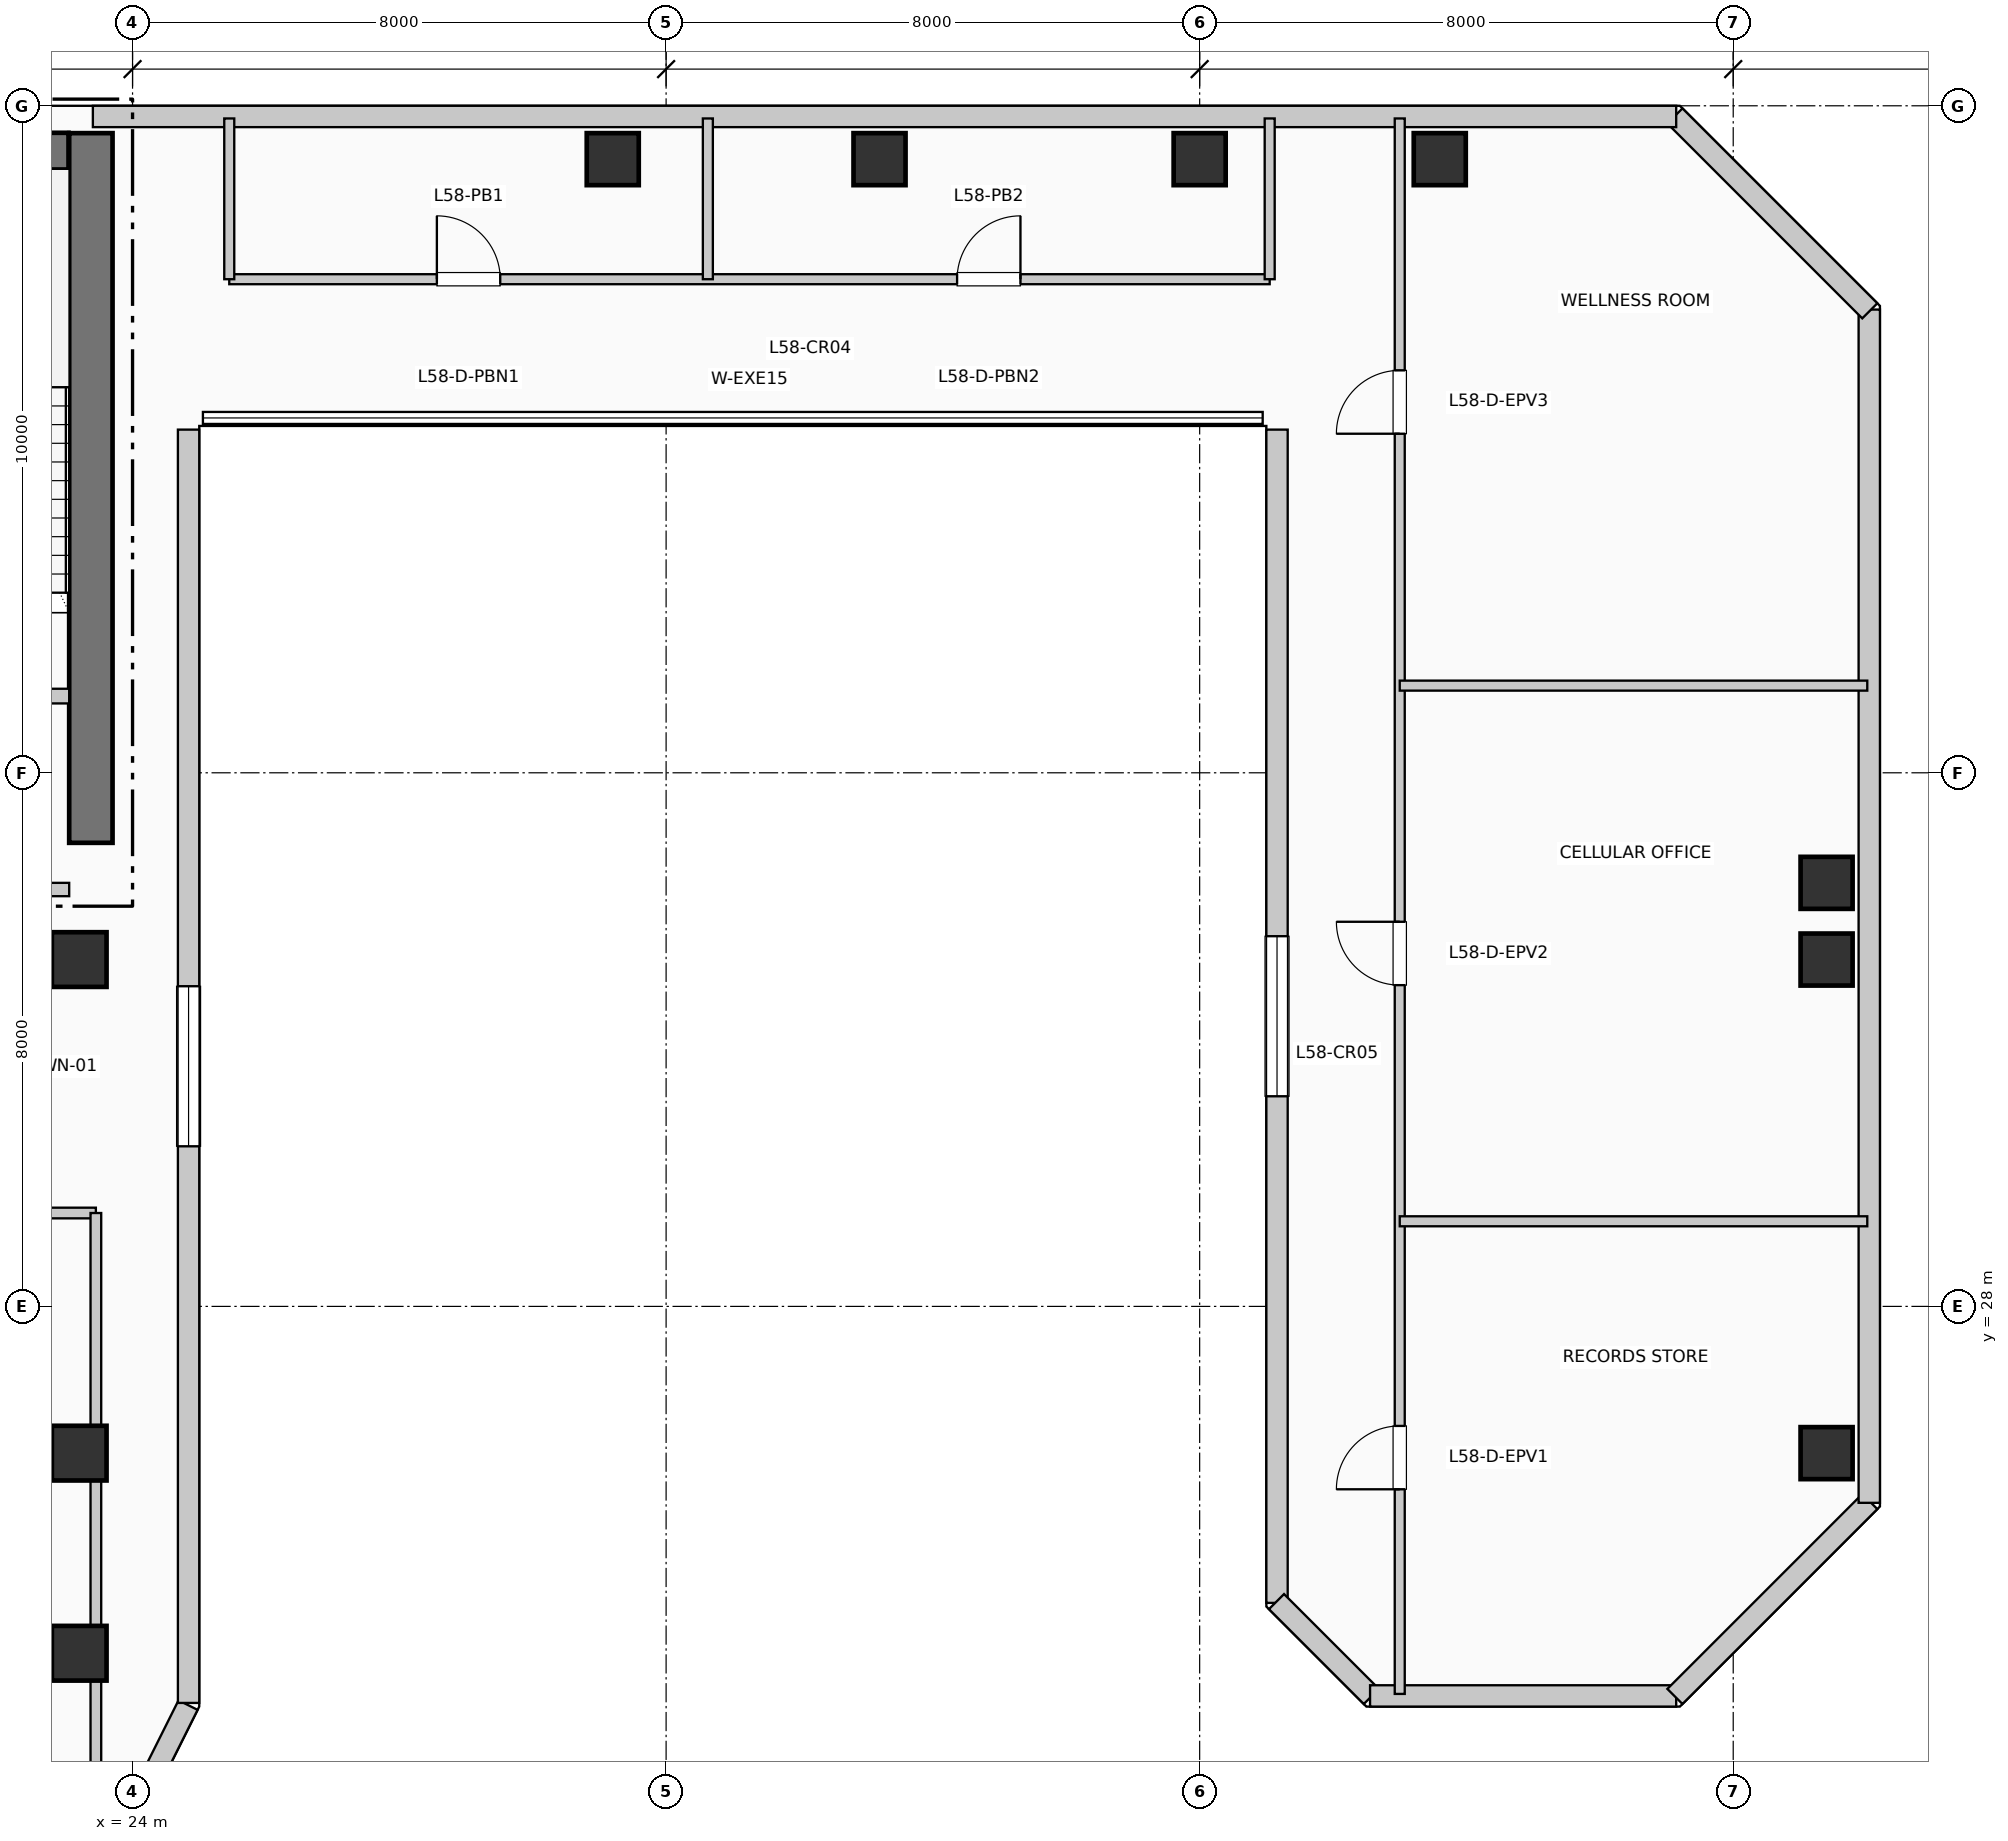
"""IFC4 building model, lengths in metres.
Left out: names, types, materials, properties, quantities, classifications, styles, units other than length and angle.
Written with IfcOpenShell. Run it as: python <this file> out.ifc"""

import sys

from ifc_helpers import new_model, si_unit, direction, frame, frame_2d, origin, origin_2d, place, context, subcontext, project, spatial, rectangle, extrude, element, fill, save


model = new_model("IFC4")
c1 = context("Model", 3, precision=1e-05, world=origin(), true_north=direction((0.0, 1.0)))
c2 = subcontext(c1, "Body", "Model", "MODEL_VIEW")
j1 = project(units=[si_unit("LENGTHUNIT", "METRE"), si_unit("PLANEANGLEUNIT", "RADIAN")], contexts=[c1])
p1 = place(None, origin())
s1 = spatial("IfcSite", under=j1, at=p1, CompositionType="ELEMENT")
p2 = place(p1, origin())
s2 = spatial("IfcBuilding", under=s1, at=p2, CompositionType="ELEMENT")
p3 = place(p2, frame((0.0, 0.0, 239.58)))
s3 = spatial("IfcBuildingStorey", under=s2, at=p3, CompositionType="ELEMENT", Elevation=239.58)
p4 = place(p3, frame((23.375, 34.95, 0.0), z_axis=(0.0, 0.0, 1.0), x_axis=(0.0, 1.0, 0.0)))
e1 = element("IfcWall", 1, at=p4, inside=s3, PredefinedType="SHEAR", context=c2, shape_type="SweptSolid", body=[
    extrude(rectangle(XDim=10.64, YDim=0.65, at=frame_2d((5.32, 0.0))), origin(), (0.0, 0.0, 1.0), 3.96),
])
p5 = place(p3, frame((19.35, 45.32, 0.0), z_axis=(0.0, 0.0, 1.0), x_axis=(1.0, 0.0, 0.0)))
e2 = element("IfcWall", 2, at=p5, inside=s3, PredefinedType="SHEAR", context=c2, shape_type="SweptSolid", body=[
    extrude(rectangle(XDim=3.69, YDim=0.55, at=frame_2d((1.845, 0.0))), origin(), (0.0, 0.0, 1.0), 3.96),
])
p6 = place(p5, frame((1.15, 0.0, 1.05)))
e3 = element("IfcOpeningElement", 3, at=p6, cuts=e2, PredefinedType="OPENING", context=c2, shape_type="SweptSolid", body=[
    extrude(rectangle(XDim=1.4, YDim=1.8, at=frame_2d((0.7, 0.9))), frame((0.0, 0.285, 0.0), z_axis=(0.0, -1.0, 0.0), x_axis=(1.0, 0.0, 0.0)), (0.0, 0.0, 1.0), 0.57),
])
for number, where, z_axis, x_axis in (
    (4, (23.2, 22.8, 0.0), (0.0, 0.0, 1.0), (1.0, 0.0, 0.0)),
    (5, (23.2, 25.8, 0.0), (0.0, 0.0, 1.0), (1.0, 0.0, 0.0)),
    (6, (23.2, 33.2, 0.0), (0.0, 0.0, 1.0), (1.0, 0.0, 0.0)),
):
    element("IfcColumn", number, at=place(p3, frame(where, z_axis=z_axis, x_axis=x_axis)), inside=s3, PredefinedType="COLUMN", context=c2, shape_type="SweptSolid", body=[
        extrude(rectangle(XDim=0.82, YDim=0.82, at=origin_2d()), origin(), (0.0, 0.0, 1.0), 3.96),
    ])
for number, where, z_axis, x_axis in (
    (7, (31.2, 45.2, 0.0), (0.0, 0.0, 1.0), (1.0, 0.0, 0.0)),
    (8, (35.2, 45.2, 0.0), (0.0, 0.0, 1.0), (1.0, 0.0, 0.0)),
    (9, (40.0, 45.2, 0.0), (0.0, 0.0, 1.0), (1.0, 0.0, 0.0)),
    (10, (43.6, 45.2, 0.0), (0.0, 0.0, 1.0), (1.0, 0.0, 0.0)),
    (11, (49.4, 25.8, 0.0), (0.0, 0.0, 1.0), (1.0, 0.0, 0.0)),
    (12, (49.4, 33.2, 0.0), (0.0, 0.0, 1.0), (1.0, 0.0, 0.0)),
    (13, (49.4, 34.35, 0.0), (0.0, 0.0, 1.0), (1.0, 0.0, 0.0)),
):
    element("IfcColumn", number, at=place(p3, frame(where, z_axis=z_axis, x_axis=x_axis)), inside=s3, PredefinedType="COLUMN", context=c2, shape_type="SweptSolid", body=[
        extrude(rectangle(XDim=0.78, YDim=0.78, at=origin_2d()), origin(), (0.0, 0.0, 1.0), 3.96),
    ])
p7 = place(p3, frame((23.882, 20.121, 0.0), z_axis=(0.0, 0.0, 1.0), x_axis=(0.447121734542, 0.894473115583, 0.0)))
e14 = element("IfcWall", 14, at=p7, inside=s3, PredefinedType="SOLIDWALL", context=c2, shape_type="SweptSolid", body=[
    extrude(rectangle(XDim=2.126, YDim=0.32, at=frame_2d((1.063, 0.0))), origin(), (0.0, 0.0, 1.0), 3.71),
])
p8 = place(p3, frame((24.84, 22.055, 0.0), z_axis=(0.0, 0.0, 1.0), x_axis=(0.0, 1.0, 0.0)))
e15 = element("IfcWall", 15, at=p8, inside=s3, PredefinedType="SOLIDWALL", context=c2, shape_type="SweptSolid", body=[
    extrude(rectangle(XDim=19.09, YDim=0.32, at=frame_2d((9.545, 0.0))), origin(), (0.0, 0.0, 1.0), 3.71),
])
p9 = place(p8, frame((8.345, 0.0, 0.85)))
e16 = element("IfcOpeningElement", 16, at=p9, cuts=e15, PredefinedType="OPENING", context=c2, shape_type="SweptSolid", body=[
    extrude(rectangle(XDim=2.4, YDim=2.05, at=frame_2d((1.2, 1.025))), frame((0.0, 0.17, 0.0), z_axis=(0.0, -1.0, 0.0), x_axis=(1.0, 0.0, 0.0)), (0.0, 0.0, 1.0), 0.34),
])
p10 = place(p3, frame((41.16, 41.145, 0.0), z_axis=(0.0, 0.0, 1.0), x_axis=(0.0, -1.0, 0.0)))
e17 = element("IfcWall", 17, at=p10, inside=s3, PredefinedType="SOLIDWALL", context=c2, shape_type="SweptSolid", body=[
    extrude(rectangle(XDim=17.59, YDim=0.32, at=frame_2d((8.795, 0.0))), origin(), (0.0, 0.0, 1.0), 3.71),
])
p11 = place(p10, frame((7.595, 0.0, 0.85)))
e18 = element("IfcOpeningElement", 18, at=p11, cuts=e17, PredefinedType="OPENING", context=c2, shape_type="SweptSolid", body=[
    extrude(rectangle(XDim=2.4, YDim=2.05, at=frame_2d((1.2, 1.025))), frame((0.0, 0.17, 0.0), z_axis=(0.0, -1.0, 0.0), x_axis=(1.0, 0.0, 0.0)), (0.0, 0.0, 1.0), 0.34),
])
p12 = place(p3, frame((41.152, 23.574, 0.0), z_axis=(0.0, 0.0, 1.0), x_axis=(0.707106781187, -0.707106781187, 0.0)))
e19 = element("IfcWall", 19, at=p12, inside=s3, PredefinedType="SOLIDWALL", context=c2, shape_type="SweptSolid", body=[
    extrude(rectangle(XDim=2.011, YDim=0.32, at=frame_2d((1.006, 0.0))), origin(), (0.0, 0.0, 1.0), 3.71),
])
p13 = place(p3, frame((42.555, 22.16, 0.0), z_axis=(0.0, 0.0, 1.0), x_axis=(1.0, 0.0, 0.0)))
e20 = element("IfcWall", 20, at=p13, inside=s3, PredefinedType="SOLIDWALL", context=c2, shape_type="SweptSolid", body=[
    extrude(rectangle(XDim=4.59, YDim=0.32, at=frame_2d((2.295, 0.0))), origin(), (0.0, 0.0, 1.0), 3.71),
])
p14 = place(p3, frame((47.126, 22.152, 0.0), z_axis=(0.0, 0.0, 1.0), x_axis=(0.707136318428, 0.707077242712, 0.0)))
e21 = element("IfcWall", 21, at=p14, inside=s3, PredefinedType="SOLIDWALL", context=c2, shape_type="SweptSolid", body=[
    extrude(rectangle(XDim=4.133, YDim=0.32, at=frame_2d((2.066, 0.0))), origin(), (0.0, 0.0, 1.0), 3.71),
])
p15 = place(p3, frame((50.04, 25.055, 0.0), z_axis=(0.0, 0.0, 1.0), x_axis=(0.0, 1.0, 0.0)))
e22 = element("IfcWall", 22, at=p15, inside=s3, PredefinedType="SOLIDWALL", context=c2, shape_type="SweptSolid", body=[
    extrude(rectangle(XDim=17.89, YDim=0.32, at=frame_2d((8.945, 0.0))), origin(), (0.0, 0.0, 1.0), 3.71),
])
p16 = place(p3, frame((50.048, 42.926, 0.0), z_axis=(0.0, 0.0, 1.0), x_axis=(-0.707136318428, 0.707077242712, 0.0)))
e23 = element("IfcWall", 23, at=p16, inside=s3, PredefinedType="SOLIDWALL", context=c2, shape_type="SweptSolid", body=[
    extrude(rectangle(XDim=4.133, YDim=0.32, at=frame_2d((2.066, 0.0))), origin(), (0.0, 0.0, 1.0), 3.71),
])
p17 = place(p3, frame((47.145, 45.84, 0.0), z_axis=(0.0, 0.0, 1.0), x_axis=(-1.0, 0.0, 0.0)))
e24 = element("IfcWall", 24, at=p17, inside=s3, PredefinedType="SOLIDWALL", context=c2, shape_type="SweptSolid", body=[
    extrude(rectangle(XDim=23.74, YDim=0.32, at=frame_2d((11.87, 0.0))), origin(), (0.0, 0.0, 1.0), 3.71),
])
p18 = place(p3, frame((19.9, 37.15, 0.0), z_axis=(0.0, 0.0, 1.0), x_axis=(1.0, 0.0, 0.0)))
e25 = element("IfcWall", 25, at=p18, inside=s3, PredefinedType="PARTITIONING", context=c2, shape_type="SweptSolid", body=[
    extrude(rectangle(XDim=3.15, YDim=0.22, at=frame_2d((1.575, 0.0))), origin(), (0.0, 0.0, 1.0), 3.71),
])
p19 = place(p18, frame((2.05, 0.0, 0.0), z_axis=(0.0, 0.0, 1.0), x_axis=(-1.0, 0.0, 0.0)))
e26 = element("IfcOpeningElement", 26, at=p19, cuts=e25, PredefinedType="OPENING", context=c2, shape_type="SweptSolid", body=[
    extrude(rectangle(XDim=1.05, YDim=2.15, at=frame_2d((0.525, 1.075))), frame((0.0, 0.12, 0.0), z_axis=(0.0, -1.0, 0.0), x_axis=(1.0, 0.0, 0.0)), (0.0, 0.0, 1.0), 0.24),
])
p20 = place(p3, frame((19.8, 34.25, 0.0), z_axis=(0.0, 0.0, 1.0), x_axis=(1.0, 0.0, 0.0)))
e27 = element("IfcWall", 27, at=p20, inside=s3, PredefinedType="PARTITIONING", context=c2, shape_type="SweptSolid", body=[
    extrude(rectangle(XDim=3.25, YDim=0.2, at=frame_2d((1.625, 0.0))), origin(), (0.0, 0.0, 1.0), 3.71),
])
p21 = place(p20, frame((2.15, 0.0, 0.0), z_axis=(0.0, 0.0, 1.0), x_axis=(-1.0, 0.0, 0.0)))
e28 = element("IfcOpeningElement", 28, at=p21, cuts=e27, PredefinedType="OPENING", context=c2, shape_type="SweptSolid", body=[
    extrude(rectangle(XDim=1.1, YDim=2.15, at=frame_2d((0.55, 1.075))), frame((0.0, 0.11, 0.0), z_axis=(0.0, -1.0, 0.0), x_axis=(1.0, 0.0, 0.0)), (0.0, 0.0, 1.0), 0.22),
])
p22 = place(p3, frame((9.04, 29.4, 0.0), z_axis=(0.0, 0.0, 1.0), x_axis=(1.0, 0.0, 0.0)))
e29 = element("IfcWall", 29, at=p22, inside=s3, PredefinedType="PARTITIONING", context=c2, shape_type="SweptSolid", body=[
    extrude(rectangle(XDim=14.41, YDim=0.16, at=frame_2d((7.205, 0.0))), origin(), (0.0, 0.0, 1.0), 3.365),
])
p23 = place(p3, frame((23.45, 5.99, 0.0), z_axis=(0.0, 0.0, 1.0), x_axis=(0.0, 1.0, 0.0)))
e30 = element("IfcWall", 30, at=p23, inside=s3, PredefinedType="PARTITIONING", context=c2, shape_type="SweptSolid", body=[
    extrude(rectangle(XDim=23.41, YDim=0.16, at=frame_2d((11.705, 0.0))), origin(), (0.0, 0.0, 1.0), 3.095),
])
p24 = place(p3, frame((9.04, 22.992, 0.0), z_axis=(0.0, 0.0, 1.0), x_axis=(1.0, 0.0, 0.0)))
e31 = element("IfcWall", 31, at=p24, inside=s3, PredefinedType="PARTITIONING", context=c2, shape_type="SweptSolid", body=[
    extrude(rectangle(XDim=14.41, YDim=0.13, at=frame_2d((7.205, 0.0))), origin(), (0.0, 0.0, 1.0), 3.095),
])
p25 = place(p3, frame((25.45, 43.4, 0.0), z_axis=(0.0, 0.0, 1.0), x_axis=(1.0, 0.0, 0.0)))
e32 = element("IfcWall", 32, at=p25, inside=s3, PredefinedType="PARTITIONING", context=c2, shape_type="SweptSolid", body=[
    extrude(rectangle(XDim=15.6, YDim=0.15, at=frame_2d((7.8, 0.0))), origin(), (0.0, 0.0, 1.0), 3.71),
])
p26 = place(p25, frame((3.113, 0.0, 0.0)))
e33 = element("IfcOpeningElement", 33, at=p26, cuts=e32, PredefinedType="OPENING", context=c2, shape_type="SweptSolid", body=[
    extrude(rectangle(XDim=0.95, YDim=2.15, at=frame_2d((0.475, 1.075))), frame((0.0, 0.085, 0.0), z_axis=(0.0, -1.0, 0.0), x_axis=(1.0, 0.0, 0.0)), (0.0, 0.0, 1.0), 0.17),
])
p27 = place(p25, frame((10.913, 0.0, 0.0)))
e34 = element("IfcOpeningElement", 34, at=p27, cuts=e32, PredefinedType="OPENING", context=c2, shape_type="SweptSolid", body=[
    extrude(rectangle(XDim=0.95, YDim=2.15, at=frame_2d((0.475, 1.075))), frame((0.0, 0.085, 0.0), z_axis=(0.0, -1.0, 0.0), x_axis=(1.0, 0.0, 0.0)), (0.0, 0.0, 1.0), 0.17),
])
for number, where, z_axis, x_axis in (
    (35, (25.45, 43.4, 0.0), (0.0, 0.0, 1.0), (0.0, 1.0, 0.0)),
    (36, (41.05, 43.4, 0.0), (0.0, 0.0, 1.0), (0.0, 1.0, 0.0)),
    (37, (32.626, 43.4, 0.0), (0.0, 0.0, 1.0), (0.0, 1.0, 0.0)),
):
    element("IfcWall", number, at=place(p3, frame(where, z_axis=z_axis, x_axis=x_axis)), inside=s3, PredefinedType="PARTITIONING", context=c2, shape_type="SweptSolid", body=[
        extrude(rectangle(XDim=2.41, YDim=0.15, at=frame_2d((1.205, 0.0))), origin(), (0.0, 0.0, 1.0), 3.71),
    ])
p28 = place(p3, frame((43.0, 22.19, 0.0), z_axis=(0.0, 0.0, 1.0), x_axis=(0.0, 1.0, 0.0)))
e38 = element("IfcWall", 38, at=p28, inside=s3, PredefinedType="PARTITIONING", context=c2, shape_type="SweptSolid", body=[
    extrude(rectangle(XDim=23.62, YDim=0.15, at=frame_2d((11.81, 0.0))), origin(), (0.0, 0.0, 1.0), 3.71),
])
p29 = place(p28, frame((3.068, 0.0, 0.0)))
e39 = element("IfcOpeningElement", 39, at=p29, cuts=e38, PredefinedType="OPENING", context=c2, shape_type="SweptSolid", body=[
    extrude(rectangle(XDim=0.95, YDim=2.15, at=frame_2d((0.475, 1.075))), frame((0.0, 0.085, 0.0), z_axis=(0.0, -1.0, 0.0), x_axis=(1.0, 0.0, 0.0)), (0.0, 0.0, 1.0), 0.17),
])
p30 = place(p28, frame((10.626, 0.0, 0.0)))
e40 = element("IfcOpeningElement", 40, at=p30, cuts=e38, PredefinedType="OPENING", context=c2, shape_type="SweptSolid", body=[
    extrude(rectangle(XDim=0.95, YDim=2.15, at=frame_2d((0.475, 1.075))), frame((0.0, 0.085, 0.0), z_axis=(0.0, -1.0, 0.0), x_axis=(1.0, 0.0, 0.0)), (0.0, 0.0, 1.0), 0.17),
])
p31 = place(p28, frame((18.893, 0.0, 0.0)))
e41 = element("IfcOpeningElement", 41, at=p31, cuts=e38, PredefinedType="OPENING", context=c2, shape_type="SweptSolid", body=[
    extrude(rectangle(XDim=0.95, YDim=2.15, at=frame_2d((0.475, 1.075))), frame((0.0, 0.085, 0.0), z_axis=(0.0, -1.0, 0.0), x_axis=(1.0, 0.0, 0.0)), (0.0, 0.0, 1.0), 0.17),
])
for number, where, z_axis, x_axis in (
    (42, (43.0, 29.276, 0.0), (0.0, 0.0, 1.0), (1.0, 0.0, 0.0)),
    (43, (43.0, 37.307, 0.0), (0.0, 0.0, 1.0), (1.0, 0.0, 0.0)),
):
    element("IfcWall", number, at=place(p3, frame(where, z_axis=z_axis, x_axis=x_axis)), inside=s3, PredefinedType="PARTITIONING", context=c2, shape_type="SweptSolid", body=[
        extrude(rectangle(XDim=7.01, YDim=0.15, at=frame_2d((3.505, 0.0))), origin(), (0.0, 0.0, 1.0), 3.71),
    ])
p32 = place(p9, origin())
e44 = element("IfcWindow", 44, at=p32, inside=s3, PartitioningType="SINGLE_PANEL", PredefinedType="WINDOW", context=c2, shape_type="SweptSolid", body=[
    extrude(rectangle(XDim=2.4, YDim=2.05, at=frame_2d((1.2, 1.025))), frame((0.0, 0.03, 0.0), z_axis=(0.0, -1.0, 0.0), x_axis=(1.0, 0.0, 0.0)), (0.0, 0.0, 1.0), 0.06),
])
fill(e16, e44)
p33 = place(p11, origin())
e45 = element("IfcWindow", 45, at=p33, inside=s3, PartitioningType="SINGLE_PANEL", PredefinedType="WINDOW", context=c2, shape_type="SweptSolid", body=[
    extrude(rectangle(XDim=2.4, YDim=2.05, at=frame_2d((1.2, 1.025))), frame((0.0, 0.03, 0.0), z_axis=(0.0, -1.0, 0.0), x_axis=(1.0, 0.0, 0.0)), (0.0, 0.0, 1.0), 0.06),
])
fill(e18, e45)
p34 = place(p26, origin())
e46 = element("IfcDoor", 46, at=p34, inside=s3, OperationType="SINGLE_SWING_LEFT", PredefinedType="DOOR", context=c2, shape_type="SweptSolid", body=[
    extrude(rectangle(XDim=0.95, YDim=2.15, at=frame_2d((0.475, 1.075))), frame((0.0, 0.025, 0.0), z_axis=(0.0, -1.0, 0.0), x_axis=(1.0, 0.0, 0.0)), (0.0, 0.0, 1.0), 0.05),
])
fill(e33, e46)
p35 = place(p27, origin())
e47 = element("IfcDoor", 47, at=p35, inside=s3, OperationType="SINGLE_SWING_RIGHT", PredefinedType="DOOR", context=c2, shape_type="SweptSolid", body=[
    extrude(rectangle(XDim=0.95, YDim=2.15, at=frame_2d((0.475, 1.075))), frame((0.0, 0.025, 0.0), z_axis=(0.0, -1.0, 0.0), x_axis=(1.0, 0.0, 0.0)), (0.0, 0.0, 1.0), 0.05),
])
fill(e34, e47)
p36 = place(p29, origin())
e48 = element("IfcDoor", 48, at=p36, inside=s3, OperationType="SINGLE_SWING_LEFT", PredefinedType="DOOR", context=c2, shape_type="SweptSolid", body=[
    extrude(rectangle(XDim=0.95, YDim=2.15, at=frame_2d((0.475, 1.075))), frame((0.0, 0.025, 0.0), z_axis=(0.0, -1.0, 0.0), x_axis=(1.0, 0.0, 0.0)), (0.0, 0.0, 1.0), 0.05),
])
fill(e39, e48)
p37 = place(p30, origin())
e49 = element("IfcDoor", 49, at=p37, inside=s3, OperationType="SINGLE_SWING_RIGHT", PredefinedType="DOOR", context=c2, shape_type="SweptSolid", body=[
    extrude(rectangle(XDim=0.95, YDim=2.15, at=frame_2d((0.475, 1.075))), frame((0.0, 0.025, 0.0), z_axis=(0.0, -1.0, 0.0), x_axis=(1.0, 0.0, 0.0)), (0.0, 0.0, 1.0), 0.05),
])
fill(e40, e49)
p38 = place(p31, origin())
e50 = element("IfcDoor", 50, at=p38, inside=s3, OperationType="SINGLE_SWING_LEFT", PredefinedType="DOOR", context=c2, shape_type="SweptSolid", body=[
    extrude(rectangle(XDim=0.95, YDim=2.15, at=frame_2d((0.475, 1.075))), frame((0.0, 0.025, 0.0), z_axis=(0.0, -1.0, 0.0), x_axis=(1.0, 0.0, 0.0)), (0.0, 0.0, 1.0), 0.05),
])
fill(e41, e50)
save(model, sys.argv[1])
